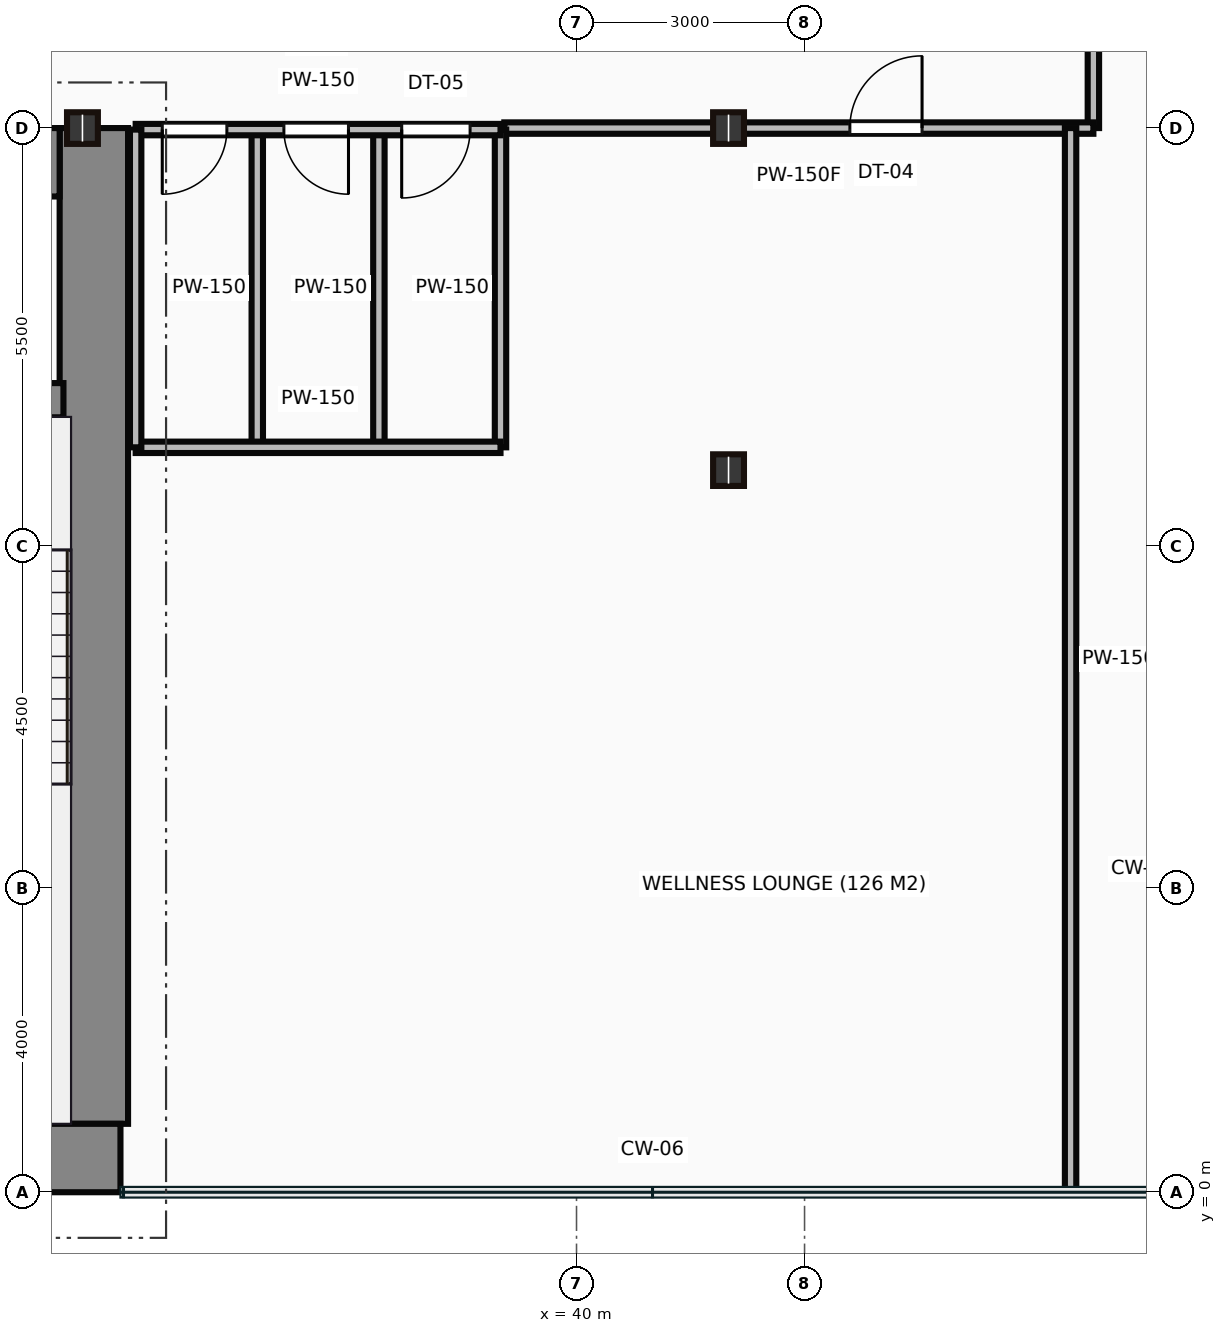
"""IFC4 building model, lengths in metres.
Left out: names, types, materials, properties, quantities, classifications, styles, units other than length and angle.
Written with IfcOpenShell. Run it as: python <this file> out.ifc"""

import sys

from ifc_helpers import new_model, si_unit, direction, frame, frame_2d, origin, origin_2d, place, context, subcontext, project, spatial, rectangle, i_section, extrude, source, transform, mapped, element, fill, save


model = new_model("IFC4")
c1 = context("Model", 3, precision=1e-05, world=origin(), true_north=direction((0.0, 1.0)))
c2 = subcontext(c1, "Body", "Model", "MODEL_VIEW")
j1 = project(units=[si_unit("LENGTHUNIT", "METRE"), si_unit("PLANEANGLEUNIT", "RADIAN")], contexts=[c1])
p1 = place(None, origin())
s1 = spatial("IfcSite", under=j1, at=p1, CompositionType="ELEMENT")
p2 = place(p1, origin())
s2 = spatial("IfcBuilding", under=s1, at=p2, CompositionType="ELEMENT")
p3 = place(p2, frame((0.0, 0.0, 79.95)))
s3 = spatial("IfcBuildingStorey", under=s2, at=p3, CompositionType="ELEMENT", Elevation=79.95)
m1 = source(origin(), c2, "Body", "SweptSolid", [
    extrude(rectangle(XDim=29.5, YDim=0.9, at=frame_2d((14.75, 0.0))), origin(), (0.0, 0.0, 1.0), 4.2),
])
p4 = place(p3, frame((4.5, 0.45, 0.0), z_axis=(0.0, 0.0, 1.0), x_axis=(1.0, 0.0, 0.0)))
e1 = element("IfcWall", 1, at=p4, inside=s3, PredefinedType="SHEAR", context=c2, shape_type="MappedRepresentation", body=[
    mapped(m1, transform((0.0, 0.0, 0.0))),
])
m2 = source(origin(), c2, "Body", "SweptSolid", [
    extrude(rectangle(XDim=13.1, YDim=0.9, at=frame_2d((6.55, 0.0))), origin(), (0.0, 0.0, 1.0), 4.2),
])
p5 = place(p3, frame((33.65, 0.9, 0.0), z_axis=(0.0, 0.0, 1.0), x_axis=(0.0, 1.0, 0.0)))
e2 = element("IfcWall", 2, at=p5, inside=s3, PredefinedType="SHEAR", context=c2, shape_type="MappedRepresentation", body=[
    mapped(m2, transform((0.0, 0.0, 0.0))),
])
m3 = source(origin(), c2, "Body", "SweptSolid", [
    extrude(rectangle(XDim=12.6, YDim=0.9, at=frame_2d((6.3, 0.0))), origin(), (0.0, 0.0, 1.0), 4.2),
])
p6 = place(p3, frame((20.6, 13.55, 0.0), z_axis=(0.0, 0.0, 1.0), x_axis=(1.0, 0.0, 0.0)))
e3 = element("IfcWall", 3, at=p6, inside=s3, PredefinedType="SHEAR", context=c2, shape_type="MappedRepresentation", body=[
    mapped(m3, transform((0.0, 0.0, 0.0))),
])
p7 = place(p6, frame((9.25, 0.0, 0.0)))
e4 = element("IfcOpeningElement", 4, at=p7, cuts=e3, PredefinedType="OPENING", context=c2, shape_type="SweptSolid", body=[
    extrude(rectangle(XDim=1.1, YDim=2.15, at=frame_2d((0.55, 1.075))), frame((0.0, 0.46, 0.0), z_axis=(0.0, -1.0, 0.0), x_axis=(1.0, 0.0, 0.0)), (0.0, 0.0, 1.0), 0.92),
])
m4 = source(origin(), c2, "Body", "SweptSolid", [
    extrude(rectangle(XDim=3.39, YDim=0.45, at=frame_2d((1.695, 0.0))), origin(), (0.0, 0.0, 1.0), 4.2),
])
p8 = place(p3, frame((29.86, 10.42, 0.0), z_axis=(0.0, 0.0, 1.0), x_axis=(1.0, 0.0, 0.0)))
e5 = element("IfcWall", 5, at=p8, inside=s3, PredefinedType="SHEAR", context=c2, shape_type="MappedRepresentation", body=[
    mapped(m4, transform((0.0, 0.0, 0.0))),
])
p9 = place(p8, frame((1.1, 0.0, 0.0)))
e6 = element("IfcOpeningElement", 6, at=p9, cuts=e5, PredefinedType="OPENING", context=c2, shape_type="SweptSolid", body=[
    extrude(rectangle(XDim=1.1, YDim=2.15, at=frame_2d((0.55, 1.075))), frame((0.0, 0.235, 0.0), z_axis=(0.0, -1.0, 0.0), x_axis=(1.0, 0.0, 0.0)), (0.0, 0.0, 1.0), 0.47),
])
m5 = source(origin(), c2, "Body", "SweptSolid", [
    extrude(i_section(OverallWidth=0.406, OverallDepth=0.416, WebThickness=0.03, FlangeThickness=0.048, at=origin_2d()), origin(), (0.0, 0.0, 1.0), 4.2),
])
for number, where, z_axis, x_axis in (
    (7, (33.5, 14.0, 0.0), (0.0, 0.0, 1.0), (1.0, 0.0, 0.0)),
    (8, (42.0, 9.5, 0.0), (0.0, 0.0, 1.0), (1.0, 0.0, 0.0)),
    (9, (42.0, 14.0, 0.0), (0.0, 0.0, 1.0), (1.0, 0.0, 0.0)),
):
    element("IfcColumn", number, at=place(p3, frame(where, z_axis=z_axis, x_axis=x_axis)), inside=s3, PredefinedType="COLUMN", context=c2, shape_type="MappedRepresentation", body=[
        mapped(m5, transform((0.0, 0.0, 0.0))),
    ])
m6 = source(origin(), c2, "Body", "SweptSolid", [
    extrude(rectangle(XDim=4.8, YDim=0.15, at=frame_2d((2.4, 0.0))), origin(), (0.0, 0.0, 1.0), 3.125),
])
p10 = place(p3, frame((34.2, 13.98, 0.0), z_axis=(0.0, 0.0, 1.0), x_axis=(1.0, 0.0, 0.0)))
e10 = element("IfcWall", 10, at=p10, inside=s3, PredefinedType="PARTITIONING", context=c2, shape_type="MappedRepresentation", body=[
    mapped(m6, transform((0.0, 0.0, 0.0))),
])
p11 = place(p10, frame((0.35, 0.0, 0.0)))
e11 = element("IfcOpeningElement", 11, at=p11, cuts=e10, PredefinedType="OPENING", context=c2, shape_type="SweptSolid", body=[
    extrude(rectangle(XDim=0.85, YDim=2.1, at=frame_2d((0.425, 1.05))), frame((0.0, 0.085, 0.0), z_axis=(0.0, -1.0, 0.0), x_axis=(1.0, 0.0, 0.0)), (0.0, 0.0, 1.0), 0.17),
])
p12 = place(p10, frame((1.95, 0.0, 0.0)))
e12 = element("IfcOpeningElement", 12, at=p12, cuts=e10, PredefinedType="OPENING", context=c2, shape_type="SweptSolid", body=[
    extrude(rectangle(XDim=0.85, YDim=2.1, at=frame_2d((0.425, 1.05))), frame((0.0, 0.085, 0.0), z_axis=(0.0, -1.0, 0.0), x_axis=(1.0, 0.0, 0.0)), (0.0, 0.0, 1.0), 0.17),
])
p13 = place(p10, frame((3.5, 0.0, 0.0)))
e13 = element("IfcOpeningElement", 13, at=p13, cuts=e10, PredefinedType="OPENING", context=c2, shape_type="SweptSolid", body=[
    extrude(rectangle(XDim=0.9, YDim=2.1, at=frame_2d((0.45, 1.05))), frame((0.0, 0.085, 0.0), z_axis=(0.0, -1.0, 0.0), x_axis=(1.0, 0.0, 0.0)), (0.0, 0.0, 1.0), 0.17),
])
m7 = source(origin(), c2, "Body", "SweptSolid", [
    extrude(rectangle(XDim=4.8, YDim=0.15, at=frame_2d((2.4, 0.0))), origin(), (0.0, 0.0, 1.0), 3.9),
])
p14 = place(p3, frame((34.2, 9.8, 0.0), z_axis=(0.0, 0.0, 1.0), x_axis=(1.0, 0.0, 0.0)))
e14 = element("IfcWall", 14, at=p14, inside=s3, PredefinedType="PARTITIONING", context=c2, shape_type="MappedRepresentation", body=[
    mapped(m7, transform((0.0, 0.0, 0.0))),
])
m8 = source(origin(), c2, "Body", "SweptSolid", [
    extrude(rectangle(XDim=4.18, YDim=0.15, at=frame_2d((2.09, 0.0))), origin(), (0.0, 0.0, 1.0), 3.9),
])
for number, where, z_axis, x_axis in (
    (15, (39.0, 9.8, 0.0), (0.0, 0.0, 1.0), (0.0, 1.0, 0.0)),
    (16, (34.2, 9.8, 0.0), (0.0, 0.0, 1.0), (0.0, 1.0, 0.0)),
    (17, (35.8, 9.8, 0.0), (0.0, 0.0, 1.0), (0.0, 1.0, 0.0)),
    (18, (37.4, 9.8, 0.0), (0.0, 0.0, 1.0), (0.0, 1.0, 0.0)),
):
    element("IfcWall", number, at=place(p3, frame(where, z_axis=z_axis, x_axis=x_axis)), inside=s3, PredefinedType="PARTITIONING", context=c2, shape_type="MappedRepresentation", body=[
        mapped(m8, transform((0.0, 0.0, 0.0))),
    ])
m9 = source(origin(), c2, "Body", "SweptSolid", [
    extrude(rectangle(XDim=2.25, YDim=0.15, at=frame_2d((1.125, 0.0))), origin(), (0.0, 0.0, 1.0), 3.9),
])
p15 = place(p3, frame((46.8, 16.25, 0.0), z_axis=(0.0, 0.0, 1.0), x_axis=(0.0, -1.0, 0.0)))
e19 = element("IfcWall", 19, at=p15, inside=s3, PredefinedType="PARTITIONING", context=c2, shape_type="MappedRepresentation", body=[
    mapped(m9, transform((0.0, 0.0, 0.0))),
])
m10 = source(origin(), c2, "Body", "SweptSolid", [
    extrude(rectangle(XDim=7.75, YDim=0.15, at=frame_2d((3.875, 0.0))), origin(), (0.0, 0.0, 1.0), 3.125),
])
p16 = place(p3, frame((46.8, 14.0, 0.0), z_axis=(0.0, 0.0, 1.0), x_axis=(-1.0, 0.0, 0.0)))
e20 = element("IfcWall", 20, at=p16, inside=s3, PredefinedType="PARTITIONING", context=c2, shape_type="MappedRepresentation", body=[
    mapped(m10, transform((0.0, 0.0, 0.0))),
])
p17 = place(p16, frame((2.254, 0.0, 0.0)))
e21 = element("IfcOpeningElement", 21, at=p17, cuts=e20, PredefinedType="OPENING", context=c2, shape_type="SweptSolid", body=[
    extrude(rectangle(XDim=0.95, YDim=2.15, at=frame_2d((0.475, 1.075))), frame((0.0, 0.085, 0.0), z_axis=(0.0, -1.0, 0.0), x_axis=(1.0, 0.0, 0.0)), (0.0, 0.0, 1.0), 0.17),
])
m11 = source(origin(), c2, "Body", "SweptSolid", [
    extrude(rectangle(XDim=13.98, YDim=0.15, at=frame_2d((6.99, 0.0))), origin(), (0.0, 0.0, 1.0), 3.9),
])
p18 = place(p3, frame((46.5, 14.0, 0.0), z_axis=(0.0, 0.0, 1.0), x_axis=(0.0, -1.0, 0.0)))
e22 = element("IfcWall", 22, at=p18, inside=s3, PredefinedType="PARTITIONING", context=c2, shape_type="MappedRepresentation", body=[
    mapped(m11, transform((0.0, 0.0, 0.0))),
])
m12 = source(origin(), c2, "Body", "SweptSolid", [
    extrude(rectangle(XDim=0.85, YDim=2.1, at=frame_2d((0.425, 1.05))), frame((0.0, 0.025, 0.0), z_axis=(0.0, -1.0, 0.0), x_axis=(1.0, 0.0, 0.0)), (0.0, 0.0, 1.0), 0.05),
])
p19 = place(p11, frame((0.85, 0.0, 0.0), z_axis=(0.0, 0.0, 1.0), x_axis=(-1.0, 0.0, 0.0)))
e23 = element("IfcDoor", 23, at=p19, inside=s3, OperationType="SINGLE_SWING_LEFT", PredefinedType="DOOR", context=c2, shape_type="MappedRepresentation", body=[
    mapped(m12, transform((0.0, 0.0, 0.0))),
])
fill(e11, e23)
p20 = place(p12, frame((0.85, 0.0, 0.0), z_axis=(0.0, 0.0, 1.0), x_axis=(-1.0, 0.0, 0.0)))
e24 = element("IfcDoor", 24, at=p20, inside=s3, OperationType="SINGLE_SWING_RIGHT", PredefinedType="DOOR", context=c2, shape_type="MappedRepresentation", body=[
    mapped(m12, transform((0.0, 0.0, 0.0))),
])
fill(e12, e24)
m13 = source(origin(), c2, "Body", "SweptSolid", [
    extrude(rectangle(XDim=0.9, YDim=2.1, at=frame_2d((0.45, 1.05))), frame((0.0, 0.025, 0.0), z_axis=(0.0, -1.0, 0.0), x_axis=(1.0, 0.0, 0.0)), (0.0, 0.0, 1.0), 0.05),
])
p21 = place(p13, frame((0.9, 0.0, 0.0), z_axis=(0.0, 0.0, 1.0), x_axis=(-1.0, 0.0, 0.0)))
e25 = element("IfcDoor", 25, at=p21, inside=s3, OperationType="SINGLE_SWING_LEFT", PredefinedType="DOOR", context=c2, shape_type="MappedRepresentation", body=[
    mapped(m13, transform((0.0, 0.0, 0.0))),
])
fill(e13, e25)
m14 = source(origin(), c2, "Body", "SweptSolid", [
    extrude(rectangle(XDim=0.95, YDim=2.15, at=frame_2d((0.475, 1.075))), frame((0.0, 0.025, 0.0), z_axis=(0.0, -1.0, 0.0), x_axis=(1.0, 0.0, 0.0)), (0.0, 0.0, 1.0), 0.05),
])
p22 = place(p17, origin())
e26 = element("IfcDoor", 26, at=p22, inside=s3, OperationType="SINGLE_SWING_LEFT", PredefinedType="DOOR", context=c2, shape_type="MappedRepresentation", body=[
    mapped(m14, transform((0.0, 0.0, 0.0))),
])
fill(e21, e26)
save(model, sys.argv[1])
